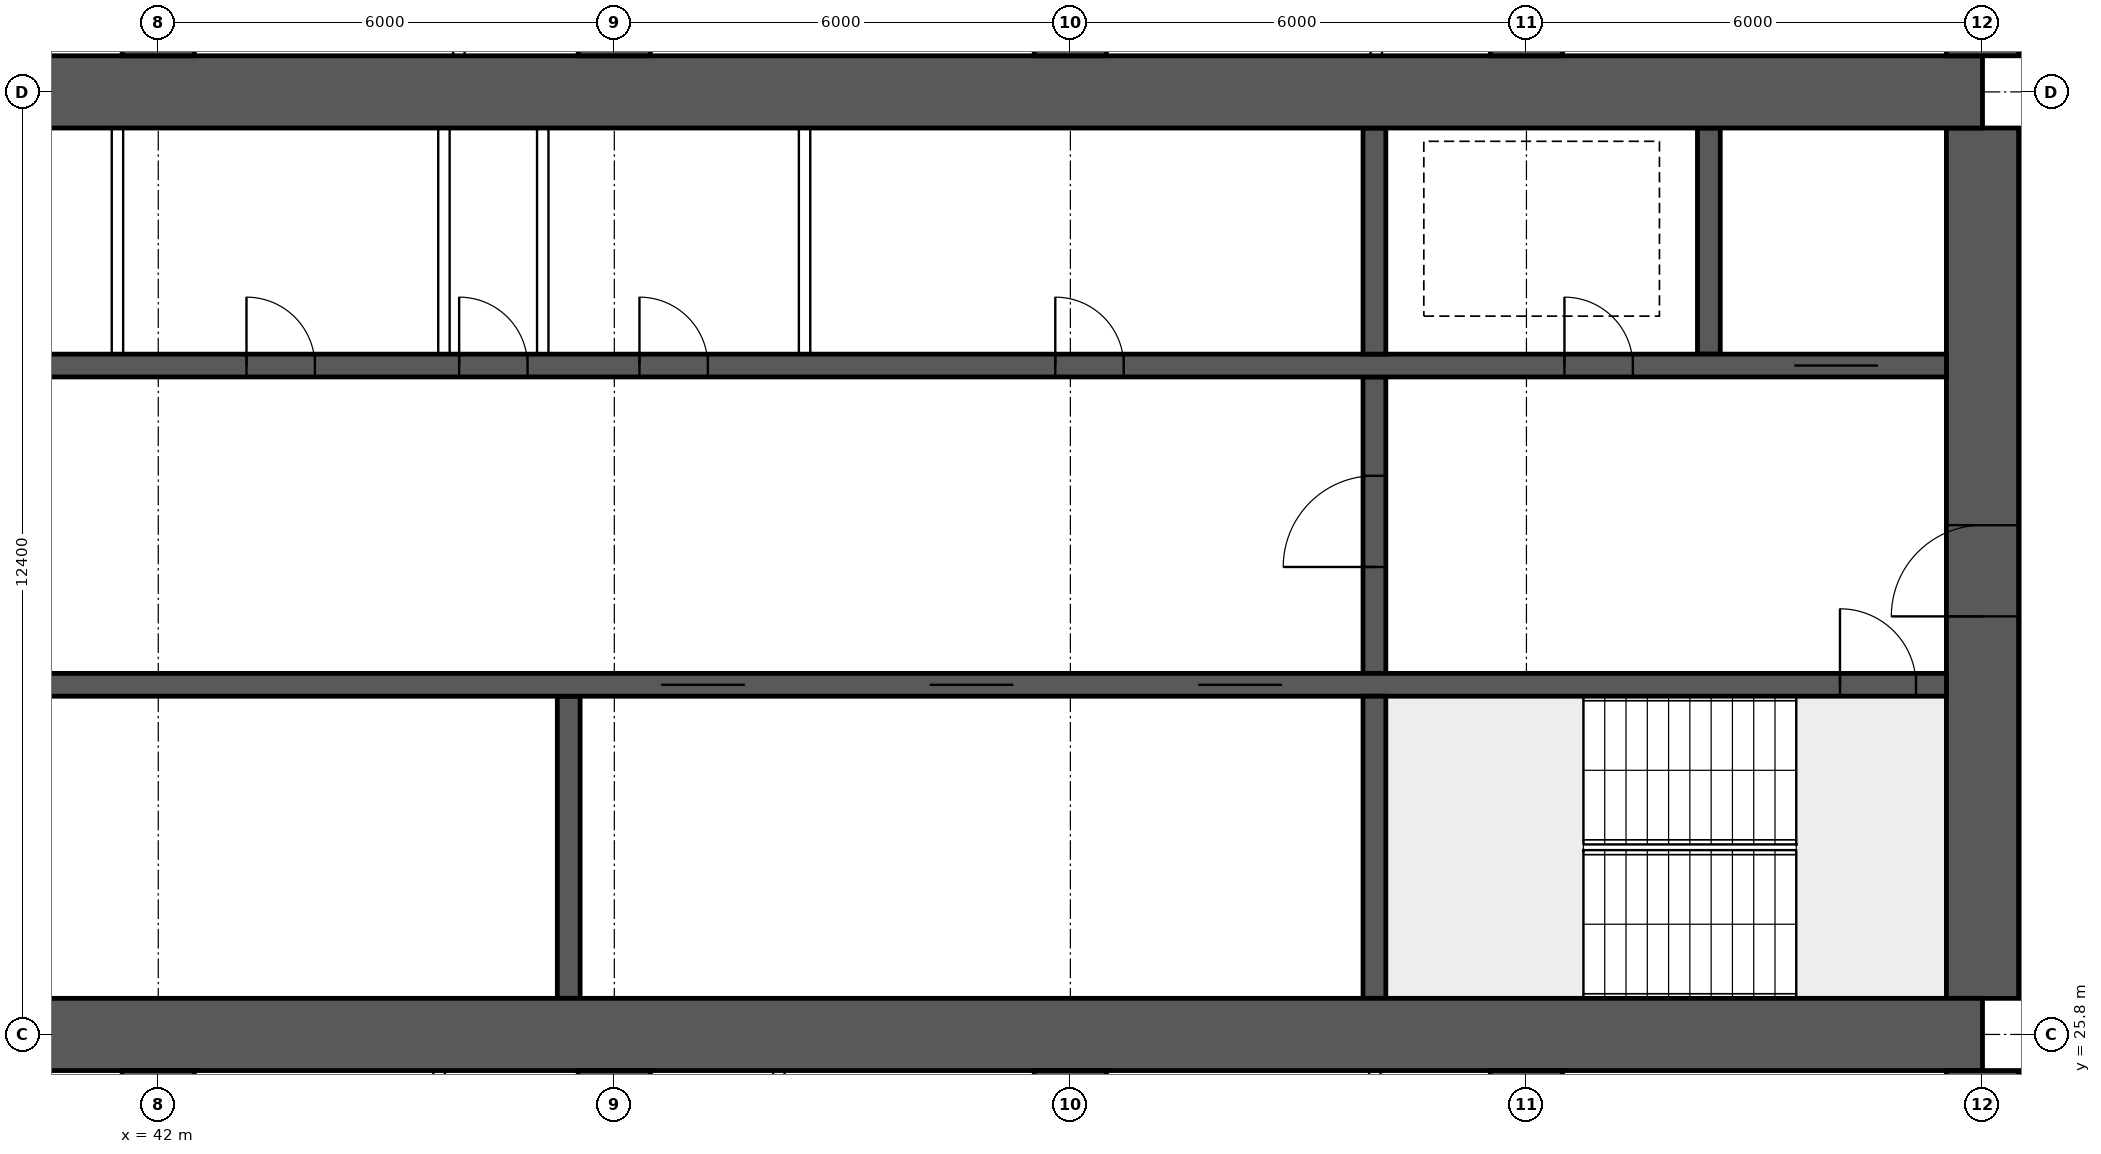
"""IFC4 building model, lengths in metres.
Left out: names, types, materials, properties, quantities, classifications, styles, units other than length and angle.
Written with IfcOpenShell. Run it as: python <this file> out.ifc"""

import sys

from ifc_helpers import new_model, si_unit, direction, frame, frame_2d, origin, place, context, subcontext, project, spatial, rectangle, extrude, element, fill, save


model = new_model("IFC4")
c1 = context("Model", 3, precision=1e-05, world=origin(), true_north=direction((0.0, 1.0)))
c2 = subcontext(c1, "Body", "Model", "MODEL_VIEW")
j1 = project(units=[si_unit("LENGTHUNIT", "METRE"), si_unit("PLANEANGLEUNIT", "RADIAN")], contexts=[c1])
p1 = place(None, origin())
s1 = spatial("IfcSite", under=j1, at=p1, CompositionType="ELEMENT")
p2 = place(p1, origin())
s2 = spatial("IfcBuilding", under=s1, at=p2, CompositionType="ELEMENT")
p3 = place(p2, frame((0.0, 0.0, 106.9)))
s3 = spatial("IfcBuildingStorey", under=s2, at=p3, CompositionType="ELEMENT", Elevation=106.9)
for number, where, z_axis, x_axis in (
    (1, (18.0, 25.8, 0.0), (0.0, 0.0, 1.0), (1.0, 0.0, 0.0)),
    (2, (18.0, 38.2, 0.0), (0.0, 0.0, 1.0), (1.0, 0.0, 0.0)),
):
    element("IfcWall", number, at=place(p3, frame(where, z_axis=z_axis, x_axis=x_axis)), inside=s3, PredefinedType="SHEAR", context=c2, shape_type="SweptSolid", body=[
        extrude(rectangle(XDim=48.0, YDim=0.95, at=frame_2d((24.0, 0.0))), origin(), (0.0, 0.0, 1.0), 3.75),
    ])
p4 = place(p3, frame((66.0, 26.275, 0.0), z_axis=(0.0, 0.0, 1.0), x_axis=(0.0, 1.0, 0.0)))
e3 = element("IfcWall", 3, at=p4, inside=s3, PredefinedType="SHEAR", context=c2, shape_type="SweptSolid", body=[
    extrude(rectangle(XDim=11.45, YDim=0.95, at=frame_2d((5.725, 0.0))), origin(), (0.0, 0.0, 1.0), 3.75),
])
p5 = place(p4, frame((5.025, 0.0, 0.0)))
e4 = element("IfcOpeningElement", 4, at=p5, cuts=e3, PredefinedType="OPENING", context=c2, shape_type="SweptSolid", body=[
    extrude(rectangle(XDim=1.2, YDim=2.1, at=frame_2d((0.6, 1.05))), frame((0.0, 0.485, 0.0), z_axis=(0.0, -1.0, 0.0), x_axis=(1.0, 0.0, 0.0)), (0.0, 0.0, 1.0), 0.97),
])
p6 = place(p3, frame((18.475, 30.4, 0.0), z_axis=(0.0, 0.0, 1.0), x_axis=(1.0, 0.0, 0.0)))
e5 = element("IfcWall", 5, at=p6, inside=s3, PredefinedType="SHEAR", context=c2, shape_type="SweptSolid", body=[
    extrude(rectangle(XDim=47.05, YDim=0.3, at=frame_2d((23.525, 0.0))), origin(), (0.0, 0.0, 1.0), 3.75),
])
p7 = place(p6, frame((0.4, 0.0, 0.0)))
e6 = element("IfcOpeningElement", 6, at=p7, cuts=e5, PredefinedType="OPENING", context=c2, shape_type="SweptSolid", body=[
    extrude(rectangle(XDim=1.0, YDim=2.1, at=frame_2d((0.5, 1.05))), frame((0.0, 0.16, 0.0), z_axis=(0.0, -1.0, 0.0), x_axis=(1.0, 0.0, 0.0)), (0.0, 0.0, 1.0), 0.32),
])
p8 = place(p6, frame((45.65, 0.0, 0.0)))
e7 = element("IfcOpeningElement", 7, at=p8, cuts=e5, PredefinedType="OPENING", context=c2, shape_type="SweptSolid", body=[
    extrude(rectangle(XDim=1.0, YDim=2.1, at=frame_2d((0.5, 1.05))), frame((0.0, 0.16, 0.0), z_axis=(0.0, -1.0, 0.0), x_axis=(1.0, 0.0, 0.0)), (0.0, 0.0, 1.0), 0.32),
])
p9 = place(p6, frame((8.275, 0.0, 0.0)))
e8 = element("IfcOpeningElement", 8, at=p9, cuts=e5, PredefinedType="OPENING", context=c2, shape_type="SweptSolid", body=[
    extrude(rectangle(XDim=1.1, YDim=2.1, at=frame_2d((0.55, 1.05))), frame((0.0, 0.16, 0.0), z_axis=(0.0, -1.0, 0.0), x_axis=(1.0, 0.0, 0.0)), (0.0, 0.0, 1.0), 0.32),
])
p10 = place(p6, frame((10.875, 0.0, 0.0)))
e9 = element("IfcOpeningElement", 9, at=p10, cuts=e5, PredefinedType="OPENING", context=c2, shape_type="SweptSolid", body=[
    extrude(rectangle(XDim=1.1, YDim=2.1, at=frame_2d((0.55, 1.05))), frame((0.0, 0.16, 0.0), z_axis=(0.0, -1.0, 0.0), x_axis=(1.0, 0.0, 0.0)), (0.0, 0.0, 1.0), 0.32),
])
p11 = place(p6, frame((13.475, 0.0, 0.0)))
e10 = element("IfcOpeningElement", 10, at=p11, cuts=e5, PredefinedType="OPENING", context=c2, shape_type="SweptSolid", body=[
    extrude(rectangle(XDim=1.1, YDim=2.1, at=frame_2d((0.55, 1.05))), frame((0.0, 0.16, 0.0), z_axis=(0.0, -1.0, 0.0), x_axis=(1.0, 0.0, 0.0)), (0.0, 0.0, 1.0), 0.32),
])
p12 = place(p6, frame((16.075, 0.0, 0.0)))
e11 = element("IfcOpeningElement", 11, at=p12, cuts=e5, PredefinedType="OPENING", context=c2, shape_type="SweptSolid", body=[
    extrude(rectangle(XDim=1.1, YDim=2.1, at=frame_2d((0.55, 1.05))), frame((0.0, 0.16, 0.0), z_axis=(0.0, -1.0, 0.0), x_axis=(1.0, 0.0, 0.0)), (0.0, 0.0, 1.0), 0.32),
])
p13 = place(p6, frame((18.85, 0.0, 0.0)))
e12 = element("IfcOpeningElement", 12, at=p13, cuts=e5, PredefinedType="OPENING", context=c2, shape_type="SweptSolid", body=[
    extrude(rectangle(XDim=0.9, YDim=2.1, at=frame_2d((0.45, 1.05))), frame((0.0, 0.16, 0.0), z_axis=(0.0, -1.0, 0.0), x_axis=(1.0, 0.0, 0.0)), (0.0, 0.0, 1.0), 0.32),
])
p14 = place(p6, frame((30.142, 0.0, 0.0)))
e13 = element("IfcOpeningElement", 13, at=p14, cuts=e5, PredefinedType="OPENING", context=c2, shape_type="SweptSolid", body=[
    extrude(rectangle(XDim=1.1, YDim=2.1, at=frame_2d((0.55, 1.05))), frame((0.0, 0.16, 0.0), z_axis=(0.0, -1.0, 0.0), x_axis=(1.0, 0.0, 0.0)), (0.0, 0.0, 1.0), 0.32),
])
p15 = place(p6, frame((33.675, 0.0, 0.0)))
e14 = element("IfcOpeningElement", 14, at=p15, cuts=e5, PredefinedType="OPENING", context=c2, shape_type="SweptSolid", body=[
    extrude(rectangle(XDim=1.1, YDim=2.1, at=frame_2d((0.55, 1.05))), frame((0.0, 0.16, 0.0), z_axis=(0.0, -1.0, 0.0), x_axis=(1.0, 0.0, 0.0)), (0.0, 0.0, 1.0), 0.32),
])
p16 = place(p6, frame((37.208, 0.0, 0.0)))
e15 = element("IfcOpeningElement", 15, at=p16, cuts=e5, PredefinedType="OPENING", context=c2, shape_type="SweptSolid", body=[
    extrude(rectangle(XDim=1.1, YDim=2.1, at=frame_2d((0.55, 1.05))), frame((0.0, 0.16, 0.0), z_axis=(0.0, -1.0, 0.0), x_axis=(1.0, 0.0, 0.0)), (0.0, 0.0, 1.0), 0.32),
])
p17 = place(p3, frame((18.475, 34.6, 0.0), z_axis=(0.0, 0.0, 1.0), x_axis=(1.0, 0.0, 0.0)))
e16 = element("IfcWall", 16, at=p17, inside=s3, PredefinedType="SHEAR", context=c2, shape_type="SweptSolid", body=[
    extrude(rectangle(XDim=47.05, YDim=0.3, at=frame_2d((23.525, 0.0))), origin(), (0.0, 0.0, 1.0), 3.75),
])
p18 = place(p17, frame((0.9, 0.0, 0.0)))
e17 = element("IfcOpeningElement", 17, at=p18, cuts=e16, PredefinedType="OPENING", context=c2, shape_type="SweptSolid", body=[
    extrude(rectangle(XDim=1.1, YDim=2.1, at=frame_2d((0.55, 1.05))), frame((0.0, 0.16, 0.0), z_axis=(0.0, -1.0, 0.0), x_axis=(1.0, 0.0, 0.0)), (0.0, 0.0, 1.0), 0.32),
])
p19 = place(p17, frame((45.05, 0.0, 0.0)))
e18 = element("IfcOpeningElement", 18, at=p19, cuts=e16, PredefinedType="OPENING", context=c2, shape_type="SweptSolid", body=[
    extrude(rectangle(XDim=1.1, YDim=2.1, at=frame_2d((0.55, 1.05))), frame((0.0, 0.16, 0.0), z_axis=(0.0, -1.0, 0.0), x_axis=(1.0, 0.0, 0.0)), (0.0, 0.0, 1.0), 0.32),
])
p20 = place(p17, frame((4.125, 0.0, 0.0)))
e19 = element("IfcOpeningElement", 19, at=p20, cuts=e16, PredefinedType="OPENING", context=c2, shape_type="SweptSolid", body=[
    extrude(rectangle(XDim=0.9, YDim=2.1, at=frame_2d((0.45, 1.05))), frame((0.0, 0.16, 0.0), z_axis=(0.0, -1.0, 0.0), x_axis=(1.0, 0.0, 0.0)), (0.0, 0.0, 1.0), 0.32),
])
p21 = place(p17, frame((42.025, 0.0, 0.0)))
e20 = element("IfcOpeningElement", 20, at=p21, cuts=e16, PredefinedType="OPENING", context=c2, shape_type="SweptSolid", body=[
    extrude(rectangle(XDim=0.9, YDim=2.1, at=frame_2d((0.45, 1.05))), frame((0.0, 0.16, 0.0), z_axis=(0.0, -1.0, 0.0), x_axis=(1.0, 0.0, 0.0)), (0.0, 0.0, 1.0), 0.32),
])
p22 = place(p17, frame((8.9, 0.0, 0.0)))
e21 = element("IfcOpeningElement", 21, at=p22, cuts=e16, PredefinedType="OPENING", context=c2, shape_type="SweptSolid", body=[
    extrude(rectangle(XDim=0.9, YDim=2.1, at=frame_2d((0.45, 1.05))), frame((0.0, 0.16, 0.0), z_axis=(0.0, -1.0, 0.0), x_axis=(1.0, 0.0, 0.0)), (0.0, 0.0, 1.0), 0.32),
])
p23 = place(p17, frame((12.874, 0.0, 0.0)))
e22 = element("IfcOpeningElement", 22, at=p23, cuts=e16, PredefinedType="OPENING", context=c2, shape_type="SweptSolid", body=[
    extrude(rectangle(XDim=0.9, YDim=2.1, at=frame_2d((0.45, 1.05))), frame((0.0, 0.16, 0.0), z_axis=(0.0, -1.0, 0.0), x_axis=(1.0, 0.0, 0.0)), (0.0, 0.0, 1.0), 0.32),
])
p24 = place(p17, frame((16.521, 0.0, 0.0)))
e23 = element("IfcOpeningElement", 23, at=p24, cuts=e16, PredefinedType="OPENING", context=c2, shape_type="SweptSolid", body=[
    extrude(rectangle(XDim=0.9, YDim=2.1, at=frame_2d((0.45, 1.05))), frame((0.0, 0.16, 0.0), z_axis=(0.0, -1.0, 0.0), x_axis=(1.0, 0.0, 0.0)), (0.0, 0.0, 1.0), 0.32),
])
p25 = place(p17, frame((20.28, 0.0, 0.0)))
e24 = element("IfcOpeningElement", 24, at=p25, cuts=e16, PredefinedType="OPENING", context=c2, shape_type="SweptSolid", body=[
    extrude(rectangle(XDim=0.9, YDim=2.1, at=frame_2d((0.45, 1.05))), frame((0.0, 0.16, 0.0), z_axis=(0.0, -1.0, 0.0), x_axis=(1.0, 0.0, 0.0)), (0.0, 0.0, 1.0), 0.32),
])
p26 = place(p17, frame((24.686, 0.0, 0.0)))
e25 = element("IfcOpeningElement", 25, at=p26, cuts=e16, PredefinedType="OPENING", context=c2, shape_type="SweptSolid", body=[
    extrude(rectangle(XDim=0.9, YDim=2.1, at=frame_2d((0.45, 1.05))), frame((0.0, 0.16, 0.0), z_axis=(0.0, -1.0, 0.0), x_axis=(1.0, 0.0, 0.0)), (0.0, 0.0, 1.0), 0.32),
])
p27 = place(p17, frame((27.483, 0.0, 0.0)))
e26 = element("IfcOpeningElement", 26, at=p27, cuts=e16, PredefinedType="OPENING", context=c2, shape_type="SweptSolid", body=[
    extrude(rectangle(XDim=0.9, YDim=2.1, at=frame_2d((0.45, 1.05))), frame((0.0, 0.16, 0.0), z_axis=(0.0, -1.0, 0.0), x_axis=(1.0, 0.0, 0.0)), (0.0, 0.0, 1.0), 0.32),
])
p28 = place(p17, frame((29.856, 0.0, 0.0)))
e27 = element("IfcOpeningElement", 27, at=p28, cuts=e16, PredefinedType="OPENING", context=c2, shape_type="SweptSolid", body=[
    extrude(rectangle(XDim=0.9, YDim=2.1, at=frame_2d((0.45, 1.05))), frame((0.0, 0.16, 0.0), z_axis=(0.0, -1.0, 0.0), x_axis=(1.0, 0.0, 0.0)), (0.0, 0.0, 1.0), 0.32),
])
p29 = place(p17, frame((35.326, 0.0, 0.0)))
e28 = element("IfcOpeningElement", 28, at=p29, cuts=e16, PredefinedType="OPENING", context=c2, shape_type="SweptSolid", body=[
    extrude(rectangle(XDim=0.9, YDim=2.1, at=frame_2d((0.45, 1.05))), frame((0.0, 0.16, 0.0), z_axis=(0.0, -1.0, 0.0), x_axis=(1.0, 0.0, 0.0)), (0.0, 0.0, 1.0), 0.32),
])
p30 = place(p3, frame((58.0, 26.275, 0.0), z_axis=(0.0, 0.0, 1.0), x_axis=(0.0, 1.0, 0.0)))
e29 = element("IfcWall", 29, at=p30, inside=s3, PredefinedType="SHEAR", context=c2, shape_type="SweptSolid", body=[
    extrude(rectangle(XDim=3.975, YDim=0.3, at=frame_2d((1.988, 0.0))), origin(), (0.0, 0.0, 1.0), 3.75),
])
p31 = place(p3, frame((58.0, 30.55, 0.0), z_axis=(0.0, 0.0, 1.0), x_axis=(0.0, 1.0, 0.0)))
e30 = element("IfcWall", 30, at=p31, inside=s3, PredefinedType="SHEAR", context=c2, shape_type="SweptSolid", body=[
    extrude(rectangle(XDim=3.9, YDim=0.3, at=frame_2d((1.95, 0.0))), origin(), (0.0, 0.0, 1.0), 3.75),
])
p32 = place(p31, frame((1.4, 0.0, 0.0)))
e31 = element("IfcOpeningElement", 31, at=p32, cuts=e30, PredefinedType="OPENING", context=c2, shape_type="SweptSolid", body=[
    extrude(rectangle(XDim=1.2, YDim=2.1, at=frame_2d((0.6, 1.05))), frame((0.0, 0.16, 0.0), z_axis=(0.0, -1.0, 0.0), x_axis=(1.0, 0.0, 0.0)), (0.0, 0.0, 1.0), 0.32),
])
for number, where, z_axis, x_axis in (
    (32, (62.4, 34.75, 0.0), (0.0, 0.0, 1.0), (0.0, 1.0, 0.0)),
    (33, (58.0, 34.75, 0.0), (0.0, 0.0, 1.0), (0.0, 1.0, 0.0)),
):
    element("IfcWall", number, at=place(p3, frame(where, z_axis=z_axis, x_axis=x_axis)), inside=s3, PredefinedType="SHEAR", context=c2, shape_type="SweptSolid", body=[
        extrude(rectangle(XDim=2.975, YDim=0.3, at=frame_2d((1.488, 0.0))), origin(), (0.0, 0.0, 1.0), 3.75),
    ])
p33 = place(p3, frame((47.4, 26.275, 0.0), z_axis=(0.0, 0.0, 1.0), x_axis=(0.0, 1.0, 0.0)))
e34 = element("IfcWall", 34, at=p33, inside=s3, PredefinedType="SHEAR", context=c2, shape_type="SweptSolid", body=[
    extrude(rectangle(XDim=3.975, YDim=0.3, at=frame_2d((1.988, 0.0))), origin(), (0.0, 0.0, 1.0), 3.75),
])
for number, where, z_axis, x_axis in (
    (35, (42.0, 16.0, 0.0), (0.0, 0.0, 1.0), (0.0, 1.0, 0.0)),
    (36, (42.0, 38.675, 0.0), (0.0, 0.0, 1.0), (0.0, 1.0, 0.0)),
    (37, (48.0, 16.0, 0.0), (0.0, 0.0, 1.0), (0.0, 1.0, 0.0)),
    (38, (48.0, 38.675, 0.0), (0.0, 0.0, 1.0), (0.0, 1.0, 0.0)),
    (39, (54.0, 16.0, 0.0), (0.0, 0.0, 1.0), (0.0, 1.0, 0.0)),
    (40, (54.0, 38.675, 0.0), (0.0, 0.0, 1.0), (0.0, 1.0, 0.0)),
    (41, (60.0, 16.0, 0.0), (0.0, 0.0, 1.0), (0.0, 1.0, 0.0)),
    (42, (60.0, 38.675, 0.0), (0.0, 0.0, 1.0), (0.0, 1.0, 0.0)),
    (43, (66.0, 16.0, 0.0), (0.0, 0.0, 1.0), (0.0, 1.0, 0.0)),
    (44, (66.0, 38.675, 0.0), (0.0, 0.0, 1.0), (0.0, 1.0, 0.0)),
):
    element("IfcWall", number, at=place(p3, frame(where, z_axis=z_axis, x_axis=x_axis)), inside=s3, PredefinedType="SHEAR", context=c2, shape_type="SweptSolid", body=[
        extrude(rectangle(XDim=9.325, YDim=0.95, at=frame_2d((4.663, 0.0))), origin(), (0.0, 0.0, 1.0), 3.75),
    ])
for number, where, z_axis, x_axis in (
    (45, (41.463, 34.75, 0.0), (0.0, 0.0, 1.0), (0.0, 1.0, 0.0)),
    (46, (45.758, 34.75, 0.0), (0.0, 0.0, 1.0), (0.0, 1.0, 0.0)),
    (47, (47.058, 34.75, 0.0), (0.0, 0.0, 1.0), (0.0, 1.0, 0.0)),
    (48, (50.503, 34.75, 0.0), (0.0, 0.0, 1.0), (0.0, 1.0, 0.0)),
):
    element("IfcWall", number, at=place(p3, frame(where, z_axis=z_axis, x_axis=x_axis)), inside=s3, PredefinedType="SOLIDWALL", context=c2, shape_type="SweptSolid", body=[
        extrude(rectangle(XDim=2.975, YDim=0.15, at=frame_2d((1.488, 0.0))), origin(), (0.0, 0.0, 1.0), 3.5),
    ])
for number, where, z_axis, x_axis in (
    (49, (45.695, 16.1, 0.0), (0.0, 0.0, 1.0), (0.0, 1.0, 0.0)),
    (50, (50.165, 16.1, 0.0), (0.0, 0.0, 1.0), (0.0, 1.0, 0.0)),
    (51, (58.005, 16.1, 0.0), (0.0, 0.0, 1.0), (0.0, 1.0, 0.0)),
    (52, (45.955, 38.675, 0.0), (0.0, 0.0, 1.0), (0.0, 1.0, 0.0)),
    (53, (58.025, 38.675, 0.0), (0.0, 0.0, 1.0), (0.0, 1.0, 0.0)),
):
    element("IfcWall", number, at=place(p3, frame(where, z_axis=z_axis, x_axis=x_axis)), inside=s3, PredefinedType="PARTITIONING", context=c2, shape_type="SweptSolid", body=[
        extrude(rectangle(XDim=9.225, YDim=0.15, at=frame_2d((4.612, 0.0))), origin(), (0.0, 0.0, 1.0), 3.5),
    ])
p34 = place(p5, origin())
e54 = element("IfcDoor", 54, at=p34, inside=s3, OperationType="SINGLE_SWING_LEFT", PredefinedType="DOOR", context=c2, shape_type="SweptSolid", body=[
    extrude(rectangle(XDim=1.2, YDim=2.1, at=frame_2d((0.6, 1.05))), frame((0.0, 0.025, 0.0), z_axis=(0.0, -1.0, 0.0), x_axis=(1.0, 0.0, 0.0)), (0.0, 0.0, 1.0), 0.05),
])
fill(e4, e54)
p35 = place(p8, origin())
e55 = element("IfcDoor", 55, at=p35, inside=s3, OperationType="SINGLE_SWING_LEFT", PredefinedType="DOOR", context=c2, shape_type="SweptSolid", body=[
    extrude(rectangle(XDim=1.0, YDim=2.1, at=frame_2d((0.5, 1.05))), frame((0.0, 0.025, 0.0), z_axis=(0.0, -1.0, 0.0), x_axis=(1.0, 0.0, 0.0)), (0.0, 0.0, 1.0), 0.05),
])
fill(e7, e55)
p36 = place(p19, origin())
e56 = element("IfcDoor", 56, at=p36, inside=s3, OperationType="DOUBLE_DOOR_SLIDING", PredefinedType="DOOR", context=c2, shape_type="SweptSolid", body=[
    extrude(rectangle(XDim=1.1, YDim=2.1, at=frame_2d((0.55, 1.05))), frame((0.0, 0.025, 0.0), z_axis=(0.0, -1.0, 0.0), x_axis=(1.0, 0.0, 0.0)), (0.0, 0.0, 1.0), 0.05),
])
fill(e18, e56)
p37 = place(p21, origin())
e57 = element("IfcDoor", 57, at=p37, inside=s3, OperationType="SINGLE_SWING_LEFT", PredefinedType="DOOR", context=c2, shape_type="SweptSolid", body=[
    extrude(rectangle(XDim=0.9, YDim=2.1, at=frame_2d((0.45, 1.05))), frame((0.0, 0.025, 0.0), z_axis=(0.0, -1.0, 0.0), x_axis=(1.0, 0.0, 0.0)), (0.0, 0.0, 1.0), 0.05),
])
fill(e20, e57)
p38 = place(p32, origin())
e58 = element("IfcDoor", 58, at=p38, inside=s3, OperationType="SINGLE_SWING_LEFT", PredefinedType="DOOR", context=c2, shape_type="SweptSolid", body=[
    extrude(rectangle(XDim=1.2, YDim=2.1, at=frame_2d((0.6, 1.05))), frame((0.0, 0.025, 0.0), z_axis=(0.0, -1.0, 0.0), x_axis=(1.0, 0.0, 0.0)), (0.0, 0.0, 1.0), 0.05),
])
fill(e31, e58)
p39 = place(p26, origin())
e59 = element("IfcDoor", 59, at=p39, inside=s3, OperationType="SINGLE_SWING_LEFT", PredefinedType="DOOR", context=c2, shape_type="SweptSolid", body=[
    extrude(rectangle(XDim=0.9, YDim=2.1, at=frame_2d((0.45, 1.05))), frame((0.0, 0.025, 0.0), z_axis=(0.0, -1.0, 0.0), x_axis=(1.0, 0.0, 0.0)), (0.0, 0.0, 1.0), 0.05),
])
fill(e25, e59)
p40 = place(p27, origin())
e60 = element("IfcDoor", 60, at=p40, inside=s3, OperationType="SINGLE_SWING_LEFT", PredefinedType="DOOR", context=c2, shape_type="SweptSolid", body=[
    extrude(rectangle(XDim=0.9, YDim=2.1, at=frame_2d((0.45, 1.05))), frame((0.0, 0.025, 0.0), z_axis=(0.0, -1.0, 0.0), x_axis=(1.0, 0.0, 0.0)), (0.0, 0.0, 1.0), 0.05),
])
fill(e26, e60)
p41 = place(p28, origin())
e61 = element("IfcDoor", 61, at=p41, inside=s3, OperationType="SINGLE_SWING_LEFT", PredefinedType="DOOR", context=c2, shape_type="SweptSolid", body=[
    extrude(rectangle(XDim=0.9, YDim=2.1, at=frame_2d((0.45, 1.05))), frame((0.0, 0.025, 0.0), z_axis=(0.0, -1.0, 0.0), x_axis=(1.0, 0.0, 0.0)), (0.0, 0.0, 1.0), 0.05),
])
fill(e27, e61)
p42 = place(p29, origin())
e62 = element("IfcDoor", 62, at=p42, inside=s3, OperationType="SINGLE_SWING_LEFT", PredefinedType="DOOR", context=c2, shape_type="SweptSolid", body=[
    extrude(rectangle(XDim=0.9, YDim=2.1, at=frame_2d((0.45, 1.05))), frame((0.0, 0.025, 0.0), z_axis=(0.0, -1.0, 0.0), x_axis=(1.0, 0.0, 0.0)), (0.0, 0.0, 1.0), 0.05),
])
fill(e28, e62)
p43 = place(p14, origin())
e63 = element("IfcDoor", 63, at=p43, inside=s3, OperationType="DOUBLE_DOOR_SLIDING", PredefinedType="DOOR", context=c2, shape_type="SweptSolid", body=[
    extrude(rectangle(XDim=1.1, YDim=2.1, at=frame_2d((0.55, 1.05))), frame((0.0, 0.025, 0.0), z_axis=(0.0, -1.0, 0.0), x_axis=(1.0, 0.0, 0.0)), (0.0, 0.0, 1.0), 0.05),
])
fill(e13, e63)
p44 = place(p15, origin())
e64 = element("IfcDoor", 64, at=p44, inside=s3, OperationType="DOUBLE_DOOR_SLIDING", PredefinedType="DOOR", context=c2, shape_type="SweptSolid", body=[
    extrude(rectangle(XDim=1.1, YDim=2.1, at=frame_2d((0.55, 1.05))), frame((0.0, 0.025, 0.0), z_axis=(0.0, -1.0, 0.0), x_axis=(1.0, 0.0, 0.0)), (0.0, 0.0, 1.0), 0.05),
])
fill(e14, e64)
p45 = place(p16, origin())
e65 = element("IfcDoor", 65, at=p45, inside=s3, OperationType="DOUBLE_DOOR_SLIDING", PredefinedType="DOOR", context=c2, shape_type="SweptSolid", body=[
    extrude(rectangle(XDim=1.1, YDim=2.1, at=frame_2d((0.55, 1.05))), frame((0.0, 0.025, 0.0), z_axis=(0.0, -1.0, 0.0), x_axis=(1.0, 0.0, 0.0)), (0.0, 0.0, 1.0), 0.05),
])
fill(e15, e65)
save(model, sys.argv[1])
